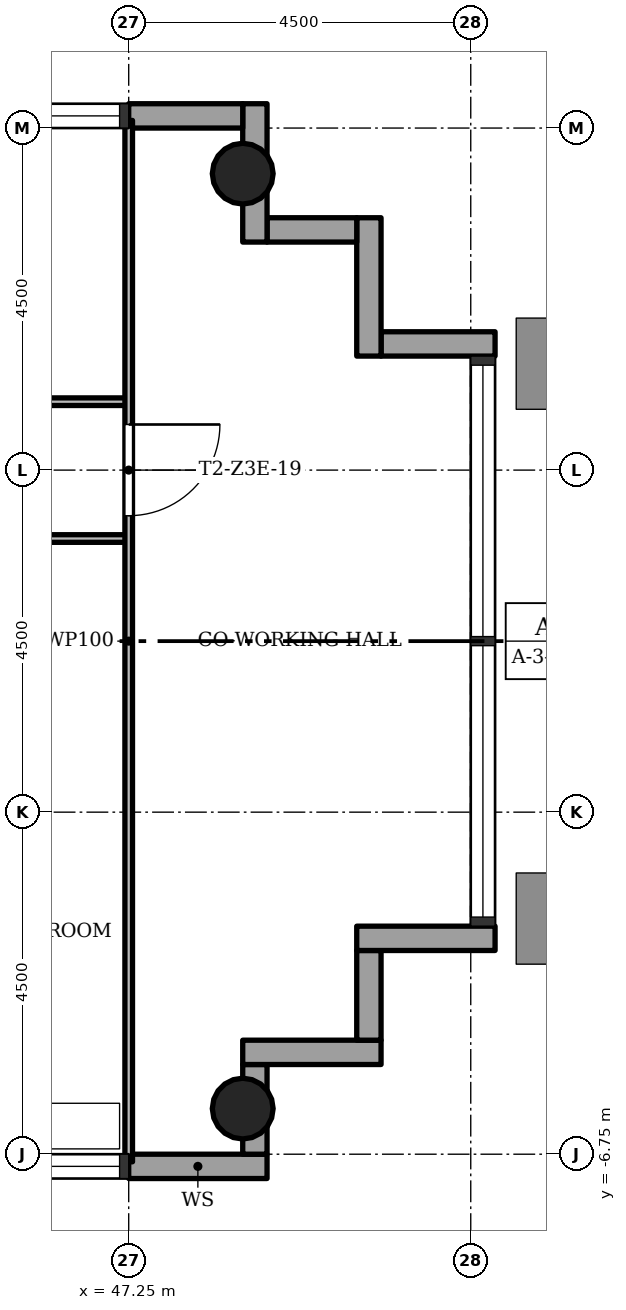
"""IFC4 building model, lengths in metres.
Left out: names, types, materials, properties, quantities, classifications, styles, units other than length and angle.
Written with IfcOpenShell. Run it as: python <this file> out.ifc"""

import sys

from ifc_helpers import new_model, si_unit, direction, frame, frame_2d, origin, origin_2d, place, context, subcontext, project, spatial, rectangle, hollow_circle, extrude, element, fill, save


model = new_model("IFC4")
c1 = context("Model", 3, precision=1e-05, world=origin(), true_north=direction((0.0, 1.0)))
c2 = subcontext(c1, "Body", "Model", "MODEL_VIEW")
j1 = project(units=[si_unit("LENGTHUNIT", "METRE"), si_unit("PLANEANGLEUNIT", "RADIAN")], contexts=[c1])
p1 = place(None, origin())
s1 = spatial("IfcSite", under=j1, at=p1, CompositionType="ELEMENT")
p2 = place(p1, origin())
s2 = spatial("IfcBuilding", under=s1, at=p2, CompositionType="ELEMENT")
p3 = place(p2, frame((0.0, 0.0, 177.9)))
s3 = spatial("IfcBuildingStorey", under=s2, at=p3, CompositionType="ELEMENT", Elevation=177.9)
for number, where, z_axis, x_axis in (
    (1, (48.75, -6.15, 0.0), (0.0, 0.0, 1.0), (1.0, 0.0, 0.0)),
    (2, (48.75, 6.15, 0.0), (0.0, 0.0, 1.0), (1.0, 0.0, 0.0)),
):
    element("IfcColumn", number, at=place(p3, frame(where, z_axis=z_axis, x_axis=x_axis)), inside=s3, PredefinedType="COLUMN", context=c2, shape_type="SweptSolid", body=[
        extrude(hollow_circle(Radius=0.4, WallThickness=0.028, at=origin_2d()), origin(), (0.0, 0.0, 1.0), 3.4),
    ])
p4 = place(p3, frame((47.25, -6.91, -0.3), z_axis=(0.0, 0.0, 1.0), x_axis=(1.0, 0.0, 0.0)))
e3 = element("IfcWall", 3, at=p4, inside=s3, PredefinedType="STANDARD", context=c2, shape_type="SweptSolid", body=[
    extrude(rectangle(XDim=1.82, YDim=0.32, at=frame_2d((0.91, 0.0))), origin(), (0.0, 0.0, 1.0), 3.4),
])
p5 = place(p3, frame((48.91, -6.75, -0.3), z_axis=(0.0, 0.0, 1.0), x_axis=(0.0, 1.0, 0.0)))
e4 = element("IfcWall", 4, at=p5, inside=s3, PredefinedType="STANDARD", context=c2, shape_type="SweptSolid", body=[
    extrude(rectangle(XDim=1.18, YDim=0.32, at=frame_2d((0.59, 0.0))), origin(), (0.0, 0.0, 1.0), 3.4),
])
p6 = place(p3, frame((48.75, -5.41, -0.3), z_axis=(0.0, 0.0, 1.0), x_axis=(1.0, 0.0, 0.0)))
e5 = element("IfcWall", 5, at=p6, inside=s3, PredefinedType="STANDARD", context=c2, shape_type="SweptSolid", body=[
    extrude(rectangle(XDim=1.82, YDim=0.32, at=frame_2d((0.91, 0.0))), origin(), (0.0, 0.0, 1.0), 3.4),
])
p7 = place(p3, frame((50.41, -5.25, -0.3), z_axis=(0.0, 0.0, 1.0), x_axis=(0.0, 1.0, 0.0)))
e6 = element("IfcWall", 6, at=p7, inside=s3, PredefinedType="STANDARD", context=c2, shape_type="SweptSolid", body=[
    extrude(rectangle(XDim=1.18, YDim=0.32, at=frame_2d((0.59, 0.0))), origin(), (0.0, 0.0, 1.0), 3.4),
])
p8 = place(p3, frame((50.25, -3.91, -0.3), z_axis=(0.0, 0.0, 1.0), x_axis=(1.0, 0.0, 0.0)))
e7 = element("IfcWall", 7, at=p8, inside=s3, PredefinedType="STANDARD", context=c2, shape_type="SweptSolid", body=[
    extrude(rectangle(XDim=1.82, YDim=0.32, at=frame_2d((0.91, 0.0))), origin(), (0.0, 0.0, 1.0), 3.4),
])
p9 = place(p3, frame((52.07, 3.91, -0.3), z_axis=(0.0, 0.0, 1.0), x_axis=(-1.0, 0.0, 0.0)))
e8 = element("IfcWall", 8, at=p9, inside=s3, PredefinedType="STANDARD", context=c2, shape_type="SweptSolid", body=[
    extrude(rectangle(XDim=1.5, YDim=0.32, at=frame_2d((0.75, 0.0))), origin(), (0.0, 0.0, 1.0), 3.4),
])
p10 = place(p3, frame((50.41, 3.75, -0.3), z_axis=(0.0, 0.0, 1.0), x_axis=(0.0, 1.0, 0.0)))
e9 = element("IfcWall", 9, at=p10, inside=s3, PredefinedType="STANDARD", context=c2, shape_type="SweptSolid", body=[
    extrude(rectangle(XDim=1.82, YDim=0.32, at=frame_2d((0.91, 0.0))), origin(), (0.0, 0.0, 1.0), 3.4),
])
p11 = place(p3, frame((50.25, 5.41, -0.3), z_axis=(0.0, 0.0, 1.0), x_axis=(-1.0, 0.0, 0.0)))
e10 = element("IfcWall", 10, at=p11, inside=s3, PredefinedType="STANDARD", context=c2, shape_type="SweptSolid", body=[
    extrude(rectangle(XDim=1.18, YDim=0.32, at=frame_2d((0.59, 0.0))), origin(), (0.0, 0.0, 1.0), 3.4),
])
p12 = place(p3, frame((48.91, 5.25, -0.3), z_axis=(0.0, 0.0, 1.0), x_axis=(0.0, 1.0, 0.0)))
e11 = element("IfcWall", 11, at=p12, inside=s3, PredefinedType="STANDARD", context=c2, shape_type="SweptSolid", body=[
    extrude(rectangle(XDim=1.82, YDim=0.32, at=frame_2d((0.91, 0.0))), origin(), (0.0, 0.0, 1.0), 3.4),
])
p13 = place(p3, frame((48.75, 6.91, -0.3), z_axis=(0.0, 0.0, 1.0), x_axis=(-1.0, 0.0, 0.0)))
e12 = element("IfcWall", 12, at=p13, inside=s3, PredefinedType="STANDARD", context=c2, shape_type="SweptSolid", body=[
    extrude(rectangle(XDim=1.5, YDim=0.32, at=frame_2d((0.75, 0.0))), origin(), (0.0, 0.0, 1.0), 3.4),
])
p14 = place(p3, frame((47.25, 1.35, 0.0), z_axis=(0.0, 0.0, 1.0), x_axis=(-1.0, 0.0, 0.0)))
e13 = element("IfcWall", 13, at=p14, inside=s3, PredefinedType="PARTITIONING", context=c2, shape_type="SweptSolid", body=[
    extrude(rectangle(XDim=2.7, YDim=0.1, at=frame_2d((1.35, 0.0))), origin(), (0.0, 0.0, 1.0), 3.0),
])
p15 = place(p14, frame((1.73, 0.0, 0.0)))
e14 = element("IfcOpeningElement", 14, at=p15, cuts=e13, PredefinedType="OPENING", context=c2, shape_type="SweptSolid", body=[
    extrude(rectangle(XDim=0.9, YDim=2.1, at=frame_2d((0.45, 1.05))), frame((0.0, 0.06, 0.0), z_axis=(0.0, -1.0, 0.0), x_axis=(1.0, 0.0, 0.0)), (0.0, 0.0, 1.0), 0.12),
])
p16 = place(p3, frame((47.25, 3.15, 0.0), z_axis=(0.0, 0.0, 1.0), x_axis=(-1.0, 0.0, 0.0)))
e15 = element("IfcWall", 15, at=p16, inside=s3, PredefinedType="PARTITIONING", context=c2, shape_type="SweptSolid", body=[
    extrude(rectangle(XDim=4.5, YDim=0.1, at=frame_2d((2.25, 0.0))), origin(), (0.0, 0.0, 1.0), 3.0),
])
p17 = place(p16, frame((1.8, 0.0, 0.0)))
e16 = element("IfcOpeningElement", 16, at=p17, cuts=e15, PredefinedType="OPENING", context=c2, shape_type="SweptSolid", body=[
    extrude(rectangle(XDim=0.9, YDim=2.1, at=frame_2d((0.45, 1.05))), frame((0.0, 0.06, 0.0), z_axis=(0.0, -1.0, 0.0), x_axis=(1.0, 0.0, 0.0)), (0.0, 0.0, 1.0), 0.12),
])
p18 = place(p3, frame((47.25, -6.85, 0.0), z_axis=(0.0, 0.0, 1.0), x_axis=(0.0, 1.0, 0.0)))
e17 = element("IfcWall", 17, at=p18, inside=s3, PredefinedType="PARTITIONING", context=c2, shape_type="SweptSolid", body=[
    extrude(rectangle(XDim=13.7, YDim=0.1, at=frame_2d((6.85, 0.0))), origin(), (0.0, 0.0, 1.0), 3.0),
])
p19 = place(p18, frame((8.5, 0.0, 0.0)))
e18 = element("IfcOpeningElement", 18, at=p19, cuts=e17, PredefinedType="OPENING", context=c2, shape_type="SweptSolid", body=[
    extrude(rectangle(XDim=1.2, YDim=2.1, at=frame_2d((0.6, 1.05))), frame((0.0, 0.06, 0.0), z_axis=(0.0, -1.0, 0.0), x_axis=(1.0, 0.0, 0.0)), (0.0, 0.0, 1.0), 0.12),
])
p20 = place(p19, origin())
e19 = element("IfcDoor", 19, at=p20, inside=s3, OperationType="SINGLE_SWING_RIGHT", PredefinedType="DOOR", context=c2, shape_type="SweptSolid", body=[
    extrude(rectangle(XDim=1.2, YDim=2.1, at=frame_2d((0.6, 1.05))), frame((0.0, 0.025, 0.0), z_axis=(0.0, -1.0, 0.0), x_axis=(1.0, 0.0, 0.0)), (0.0, 0.0, 1.0), 0.05),
])
fill(e18, e19)
save(model, sys.argv[1])
